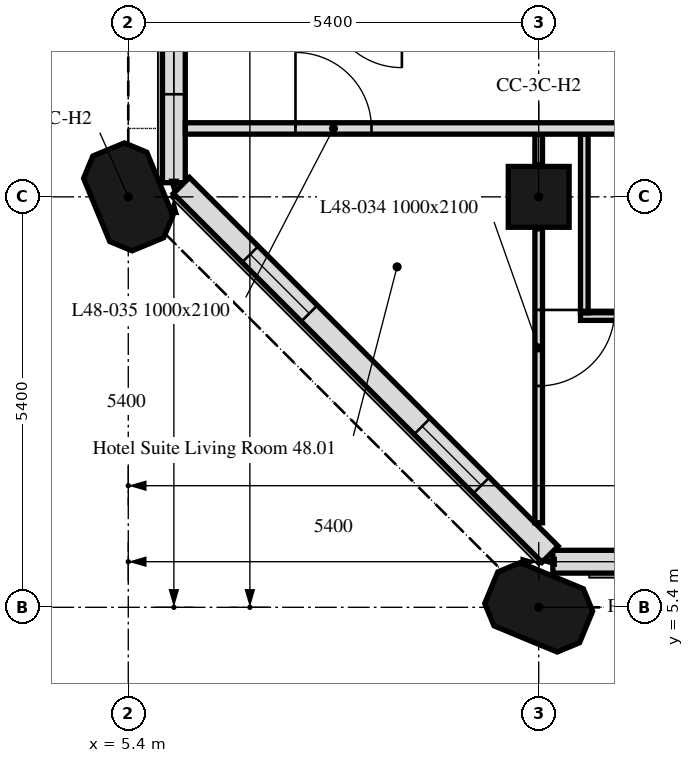
"""IFC4 building model, lengths in metres.
Left out: names, types, materials, properties, quantities, classifications, styles, units other than length and angle.
Written with IfcOpenShell. Run it as: python <this file> out.ifc"""

import sys

from ifc_helpers import new_model, si_unit, direction, frame, frame_2d, origin, origin_2d, place, context, subcontext, project, spatial, polyline, rectangle, outline, extrude, element, fill, save


model = new_model("IFC4")
c1 = context("Model", 3, precision=1e-05, world=origin(), true_north=direction((0.0, 1.0)))
c2 = subcontext(c1, "Body", "Model", "MODEL_VIEW")
j1 = project(units=[si_unit("LENGTHUNIT", "METRE"), si_unit("PLANEANGLEUNIT", "RADIAN")], contexts=[c1])
p1 = place(None, origin())
s1 = spatial("IfcSite", under=j1, at=p1, CompositionType="ELEMENT")
p2 = place(p1, origin())
s2 = spatial("IfcBuilding", under=s1, at=p2, CompositionType="ELEMENT")
p3 = place(p2, frame((0.0, 0.0, 197.2)))
s3 = spatial("IfcBuildingStorey", under=s2, at=p3, CompositionType="ELEMENT", Elevation=197.2)
for number, where, z_axis, x_axis in (
    (1, (10.8, 5.4, 0.0), (0.0, 0.0, 1.0), (-0.924, 0.383, 0.0)),
    (2, (5.4, 10.8, 0.0), (0.0, 0.0, 1.0), (-0.383, 0.924, 0.0)),
):
    element("IfcColumn", number, at=place(p3, frame(where, z_axis=z_axis, x_axis=x_axis)), inside=s3, PredefinedType="COLUMN", context=c2, shape_type="SweptSolid", body=[
        extrude(outline(polyline([(-0.45, -0.45), (0.45, -0.45), (0.675, -0.225), (0.675, 0.225), (0.45, 0.45), (-0.45, 0.45), (-0.675, 0.225), (-0.675, -0.225), (-0.45, -0.45)])), origin(), (0.0, 0.0, 1.0), 3.0),
    ])
p4 = place(p3, frame((10.8, 10.8, 0.0), z_axis=(0.0, 0.0, 1.0), x_axis=(1.0, 0.0, 0.0)))
e3 = element("IfcColumn", 3, at=p4, inside=s3, PredefinedType="COLUMN", context=c2, shape_type="SweptSolid", body=[
    extrude(rectangle(XDim=0.8, YDim=0.8, at=origin_2d()), origin(), (0.0, 0.0, 1.0), 3.0),
])
p5 = place(p3, frame((10.986, 6.0, 0.0), z_axis=(0.0, 0.0, 1.0), x_axis=(1.0, 0.0, 0.0)))
e4 = element("IfcWall", 4, at=p5, inside=s3, PredefinedType="SOLIDWALL", context=c2, shape_type="SweptSolid", body=[
    extrude(rectangle(XDim=32.027, YDim=0.3, at=frame_2d((16.014, 0.0))), origin(), (0.0, 0.0, 1.0), 3.0),
])
p6 = place(p5, frame((2.764, 0.0, 0.9)))
e5 = element("IfcOpeningElement", 5, at=p6, cuts=e4, PredefinedType="OPENING", context=c2, shape_type="SweptSolid", body=[
    extrude(rectangle(XDim=1.1, YDim=1.7, at=frame_2d((0.55, 0.85))), frame((0.0, 0.16, 0.0), z_axis=(0.0, -1.0, 0.0), x_axis=(1.0, 0.0, 0.0)), (0.0, 0.0, 1.0), 0.32),
])
p7 = place(p5, frame((6.214, 0.0, 0.9)))
e6 = element("IfcOpeningElement", 6, at=p7, cuts=e4, PredefinedType="OPENING", context=c2, shape_type="SweptSolid", body=[
    extrude(rectangle(XDim=3.4, YDim=1.7, at=frame_2d((1.7, 0.85))), frame((0.0, 0.16, 0.0), z_axis=(0.0, -1.0, 0.0), x_axis=(1.0, 0.0, 0.0)), (0.0, 0.0, 1.0), 0.32),
])
p8 = place(p5, frame((13.564, 0.0, 0.9)))
e7 = element("IfcOpeningElement", 7, at=p8, cuts=e4, PredefinedType="OPENING", context=c2, shape_type="SweptSolid", body=[
    extrude(rectangle(XDim=1.1, YDim=1.7, at=frame_2d((0.55, 0.85))), frame((0.0, 0.16, 0.0), z_axis=(0.0, -1.0, 0.0), x_axis=(1.0, 0.0, 0.0)), (0.0, 0.0, 1.0), 0.32),
])
p9 = place(p5, frame((17.014, 0.0, 0.9)))
e8 = element("IfcOpeningElement", 8, at=p9, cuts=e4, PredefinedType="OPENING", context=c2, shape_type="SweptSolid", body=[
    extrude(rectangle(XDim=3.4, YDim=1.7, at=frame_2d((1.7, 0.85))), frame((0.0, 0.16, 0.0), z_axis=(0.0, -1.0, 0.0), x_axis=(1.0, 0.0, 0.0)), (0.0, 0.0, 1.0), 0.32),
])
p10 = place(p5, frame((24.364, 0.0, 0.9)))
e9 = element("IfcOpeningElement", 9, at=p10, cuts=e4, PredefinedType="OPENING", context=c2, shape_type="SweptSolid", body=[
    extrude(rectangle(XDim=1.1, YDim=1.7, at=frame_2d((0.55, 0.85))), frame((0.0, 0.16, 0.0), z_axis=(0.0, -1.0, 0.0), x_axis=(1.0, 0.0, 0.0)), (0.0, 0.0, 1.0), 0.32),
])
p11 = place(p5, frame((27.814, 0.0, 0.9)))
e10 = element("IfcOpeningElement", 10, at=p11, cuts=e4, PredefinedType="OPENING", context=c2, shape_type="SweptSolid", body=[
    extrude(rectangle(XDim=3.4, YDim=1.7, at=frame_2d((1.7, 0.85))), frame((0.0, 0.16, 0.0), z_axis=(0.0, -1.0, 0.0), x_axis=(1.0, 0.0, 0.0)), (0.0, 0.0, 1.0), 0.32),
])
p12 = place(p3, frame((6.0, 16.2, 0.0), z_axis=(0.0, 0.0, 1.0), x_axis=(0.0, -1.0, 0.0)))
e11 = element("IfcWall", 11, at=p12, inside=s3, PredefinedType="SOLIDWALL", context=c2, shape_type="SweptSolid", body=[
    extrude(rectangle(XDim=5.214, YDim=0.3, at=frame_2d((2.607, 0.0))), origin(), (0.0, 0.0, 1.0), 3.0),
])
p13 = place(p12, frame((1.35, 0.0, 0.9)))
e12 = element("IfcOpeningElement", 12, at=p13, cuts=e11, PredefinedType="OPENING", context=c2, shape_type="SweptSolid", body=[
    extrude(rectangle(XDim=1.1, YDim=1.7, at=frame_2d((0.55, 0.85))), frame((0.0, 0.16, 0.0), z_axis=(0.0, -1.0, 0.0), x_axis=(1.0, 0.0, 0.0)), (0.0, 0.0, 1.0), 0.32),
])
p14 = place(p12, frame((2.95, 0.0, 0.9)))
e13 = element("IfcOpeningElement", 13, at=p14, cuts=e11, PredefinedType="OPENING", context=c2, shape_type="SweptSolid", body=[
    extrude(rectangle(XDim=1.1, YDim=1.7, at=frame_2d((0.55, 0.85))), frame((0.0, 0.16, 0.0), z_axis=(0.0, -1.0, 0.0), x_axis=(1.0, 0.0, 0.0)), (0.0, 0.0, 1.0), 0.32),
])
p15 = place(p3, frame((6.099, 10.949, 0.0), z_axis=(0.0, 0.0, 1.0), x_axis=(0.707106781187, -0.707106781187, 0.0)))
e14 = element("IfcWall", 14, at=p15, inside=s3, PredefinedType="SOLIDWALL", context=c2, shape_type="SweptSolid", body=[
    extrude(rectangle(XDim=6.86, YDim=0.3, at=frame_2d((3.43, 0.0))), origin(), (0.0, 0.0, 1.0), 3.0),
])
p16 = place(p15, frame((1.28, 0.0, 0.9)))
e15 = element("IfcOpeningElement", 15, at=p16, cuts=e14, PredefinedType="OPENING", context=c2, shape_type="SweptSolid", body=[
    extrude(rectangle(XDim=1.1, YDim=1.7, at=frame_2d((0.55, 0.85))), frame((0.0, 0.16, 0.0), z_axis=(0.0, -1.0, 0.0), x_axis=(1.0, 0.0, 0.0)), (0.0, 0.0, 1.0), 0.32),
])
p17 = place(p15, frame((4.48, 0.0, 0.9)))
e16 = element("IfcOpeningElement", 16, at=p17, cuts=e14, PredefinedType="OPENING", context=c2, shape_type="SweptSolid", body=[
    extrude(rectangle(XDim=1.1, YDim=1.7, at=frame_2d((0.55, 0.85))), frame((0.0, 0.16, 0.0), z_axis=(0.0, -1.0, 0.0), x_axis=(1.0, 0.0, 0.0)), (0.0, 0.0, 1.0), 0.32),
])
p18 = place(p3, frame((13.75, 9.225, 0.0), z_axis=(0.0, 0.0, 1.0), x_axis=(-1.0, 0.0, 0.0)))
e17 = element("IfcWall", 17, at=p18, inside=s3, PredefinedType="PARTITIONING", context=c2, shape_type="SweptSolid", body=[
    extrude(rectangle(XDim=2.4, YDim=0.1, at=frame_2d((1.2, 0.0))), origin(), (0.0, 0.0, 1.0), 3.0),
])
p19 = place(p18, frame((0.3, 0.0, 0.0)))
e18 = element("IfcOpeningElement", 18, at=p19, cuts=e17, PredefinedType="OPENING", context=c2, shape_type="SweptSolid", body=[
    extrude(rectangle(XDim=0.9, YDim=2.1, at=frame_2d((0.45, 1.05))), frame((0.0, 0.05, 0.0), z_axis=(0.0, -1.0, 0.0), x_axis=(1.0, 0.0, 0.0)), (0.0, 0.0, 1.0), 0.1),
])
p20 = place(p3, frame((11.4, 9.275, 0.0), z_axis=(0.0, 0.0, 1.0), x_axis=(0.0, 1.0, 0.0)))
e19 = element("IfcWall", 19, at=p20, inside=s3, PredefinedType="PARTITIONING", context=c2, shape_type="SweptSolid", body=[
    extrude(rectangle(XDim=2.35, YDim=0.1, at=frame_2d((1.175, 0.0))), origin(), (0.0, 0.0, 1.0), 3.0),
])
p21 = place(p3, frame((10.8, 11.625, 0.0), z_axis=(0.0, 0.0, 1.0), x_axis=(0.0, -1.0, 0.0)))
e20 = element("IfcWall", 20, at=p21, inside=s3, PredefinedType="PARTITIONING", context=c2, shape_type="SweptSolid", body=[
    extrude(rectangle(XDim=0.405, YDim=0.1, at=frame_2d((0.203, 0.0))), origin(), (0.0, 0.0, 1.0), 3.0),
])
p22 = place(p3, frame((10.8, 10.38, 0.0), z_axis=(0.0, 0.0, 1.0), x_axis=(0.0, -1.0, 0.0)))
e21 = element("IfcWall", 21, at=p22, inside=s3, PredefinedType="PARTITIONING", context=c2, shape_type="SweptSolid", body=[
    extrude(rectangle(XDim=3.868, YDim=0.1, at=frame_2d((1.934, 0.0))), origin(), (0.0, 0.0, 1.0), 3.0),
])
p23 = place(p22, frame((1.067, 0.0, 0.0)))
e22 = element("IfcOpeningElement", 22, at=p23, cuts=e21, PredefinedType="OPENING", context=c2, shape_type="SweptSolid", body=[
    extrude(rectangle(XDim=1.0, YDim=2.1, at=frame_2d((0.5, 1.05))), frame((0.0, 0.05, 0.0), z_axis=(0.0, -1.0, 0.0), x_axis=(1.0, 0.0, 0.0)), (0.0, 0.0, 1.0), 0.1),
])
p24 = place(p3, frame((6.151, 11.7, 0.0), z_axis=(0.0, 0.0, 1.0), x_axis=(1.0, 0.0, 0.0)))
e23 = element("IfcWall", 23, at=p24, inside=s3, PredefinedType="PARTITIONING", context=c2, shape_type="SweptSolid", body=[
    extrude(rectangle(XDim=41.698, YDim=0.15, at=frame_2d((20.849, 0.0))), origin(), (0.0, 0.0, 1.0), 3.0),
])
p25 = place(p24, frame((17.649, 0.0, 0.0)))
e24 = element("IfcOpeningElement", 24, at=p25, cuts=e23, PredefinedType="OPENING", context=c2, shape_type="SweptSolid", body=[
    extrude(rectangle(XDim=1.0, YDim=2.1, at=frame_2d((0.5, 1.05))), frame((0.0, 0.075, 0.0), z_axis=(0.0, -1.0, 0.0), x_axis=(1.0, 0.0, 0.0)), (0.0, 0.0, 1.0), 0.15),
])
p26 = place(p24, frame((1.449, 0.0, 0.0)))
e25 = element("IfcOpeningElement", 25, at=p26, cuts=e23, PredefinedType="OPENING", context=c2, shape_type="SweptSolid", body=[
    extrude(rectangle(XDim=1.0, YDim=2.1, at=frame_2d((0.5, 1.05))), frame((0.0, 0.075, 0.0), z_axis=(0.0, -1.0, 0.0), x_axis=(1.0, 0.0, 0.0)), (0.0, 0.0, 1.0), 0.15),
])
p27 = place(p24, frame((29.249, 0.0, 0.0)))
e26 = element("IfcOpeningElement", 26, at=p27, cuts=e23, PredefinedType="OPENING", context=c2, shape_type="SweptSolid", body=[
    extrude(rectangle(XDim=1.0, YDim=2.1, at=frame_2d((0.5, 1.05))), frame((0.0, 0.075, 0.0), z_axis=(0.0, -1.0, 0.0), x_axis=(1.0, 0.0, 0.0)), (0.0, 0.0, 1.0), 0.15),
])
p28 = place(p24, frame((37.954, 0.0, 0.0)))
e27 = element("IfcOpeningElement", 27, at=p28, cuts=e23, PredefinedType="OPENING", context=c2, shape_type="SweptSolid", body=[
    extrude(rectangle(XDim=1.0, YDim=2.1, at=frame_2d((0.5, 1.05))), frame((0.0, 0.075, 0.0), z_axis=(0.0, -1.0, 0.0), x_axis=(1.0, 0.0, 0.0)), (0.0, 0.0, 1.0), 0.15),
])
p29 = place(p14, origin())
e28 = element("IfcWindow", 28, at=p29, inside=s3, PartitioningType="SINGLE_PANEL", PredefinedType="WINDOW", context=c2, shape_type="SweptSolid", body=[
    extrude(rectangle(XDim=1.1, YDim=1.7, at=frame_2d((0.55, 0.85))), frame((0.0, 0.03, 0.0), z_axis=(0.0, -1.0, 0.0), x_axis=(1.0, 0.0, 0.0)), (0.0, 0.0, 1.0), 0.06),
])
fill(e13, e28)
p30 = place(p16, origin())
e29 = element("IfcWindow", 29, at=p30, inside=s3, PartitioningType="SINGLE_PANEL", PredefinedType="WINDOW", context=c2, shape_type="SweptSolid", body=[
    extrude(rectangle(XDim=1.1, YDim=1.7, at=frame_2d((0.55, 0.85))), frame((0.0, 0.03, 0.0), z_axis=(0.0, -1.0, 0.0), x_axis=(1.0, 0.0, 0.0)), (0.0, 0.0, 1.0), 0.06),
])
fill(e15, e29)
p31 = place(p17, origin())
e30 = element("IfcWindow", 30, at=p31, inside=s3, PartitioningType="SINGLE_PANEL", PredefinedType="WINDOW", context=c2, shape_type="SweptSolid", body=[
    extrude(rectangle(XDim=1.1, YDim=1.7, at=frame_2d((0.55, 0.85))), frame((0.0, 0.03, 0.0), z_axis=(0.0, -1.0, 0.0), x_axis=(1.0, 0.0, 0.0)), (0.0, 0.0, 1.0), 0.06),
])
fill(e16, e30)
p32 = place(p23, origin())
e31 = element("IfcDoor", 31, at=p32, inside=s3, OperationType="SINGLE_SWING_RIGHT", PredefinedType="DOOR", context=c2, shape_type="SweptSolid", body=[
    extrude(rectangle(XDim=1.0, YDim=2.1, at=frame_2d((0.5, 1.05))), frame((0.0, 0.025, 0.0), z_axis=(0.0, -1.0, 0.0), x_axis=(1.0, 0.0, 0.0)), (0.0, 0.0, 1.0), 0.05),
])
fill(e22, e31)
p33 = place(p26, origin())
e32 = element("IfcDoor", 32, at=p33, inside=s3, OperationType="SINGLE_SWING_LEFT", PredefinedType="DOOR", context=c2, shape_type="SweptSolid", body=[
    extrude(rectangle(XDim=1.0, YDim=2.1, at=frame_2d((0.5, 1.05))), frame((0.0, 0.025, 0.0), z_axis=(0.0, -1.0, 0.0), x_axis=(1.0, 0.0, 0.0)), (0.0, 0.0, 1.0), 0.05),
])
fill(e25, e32)
save(model, sys.argv[1])
